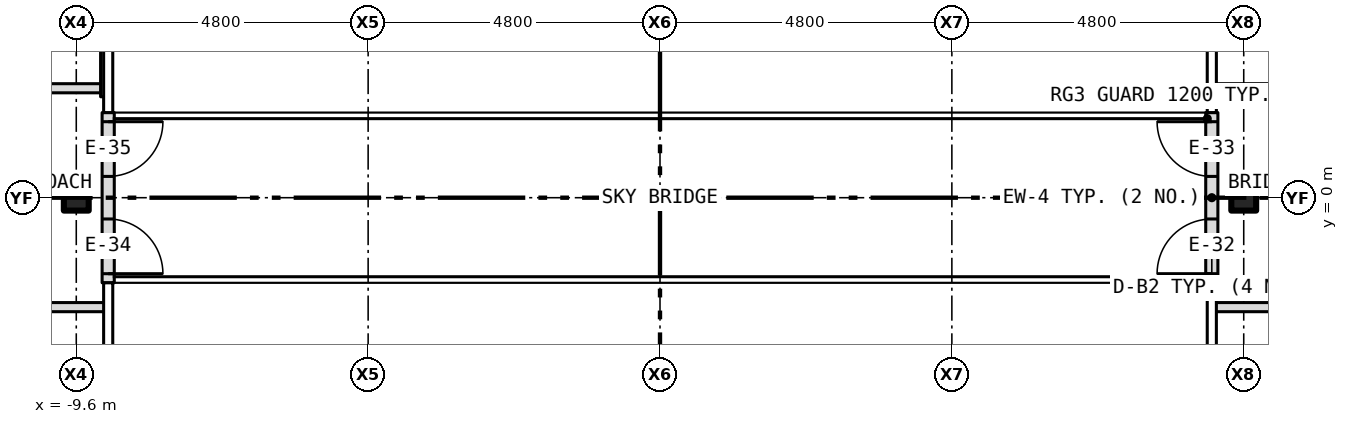
"""IFC4 building model, lengths in metres.
Left out: names, types, materials, properties, quantities, classifications, styles, units other than length and angle.
Written with IfcOpenShell. Run it as: python <this file> out.ifc"""

import sys

from ifc_helpers import new_model, si_unit, direction, frame, frame_2d, origin, origin_2d, place, context, subcontext, project, spatial, rectangle, i_section, extrude, element, fill, save


model = new_model("IFC4")
c1 = context("Model", 3, precision=1e-05, world=origin(), true_north=direction((0.0, 1.0)))
c2 = subcontext(c1, "Body", "Model", "MODEL_VIEW")
j1 = project(units=[si_unit("LENGTHUNIT", "METRE"), si_unit("PLANEANGLEUNIT", "RADIAN")], contexts=[c1])
p1 = place(None, origin())
s1 = spatial("IfcSite", under=j1, at=p1, CompositionType="ELEMENT")
p2 = place(p1, origin())
s2 = spatial("IfcBuilding", under=s1, at=p2, CompositionType="ELEMENT")
p3 = place(p2, frame((0.0, 0.0, 74.0)))
s3 = spatial("IfcBuildingStorey", under=s2, at=p3, CompositionType="ELEMENT", Elevation=74.0)
for number, where, z_axis, x_axis in (
    (1, (-9.6, 0.0, -0.15), (0.0, 0.0, 1.0), (1.0, 0.0, 0.0)),
    (2, (9.6, 0.0, -0.15), (0.0, 0.0, 1.0), (1.0, 0.0, 0.0)),
):
    element("IfcColumn", number, at=place(p3, frame(where, z_axis=z_axis, x_axis=x_axis)), inside=s3, PredefinedType="COLUMN", context=c2, shape_type="SweptSolid", body=[
        extrude(i_section(OverallWidth=0.409, OverallDepth=0.424, WebThickness=0.033, FlangeThickness=0.052, at=origin_2d()), origin(), (0.0, 0.0, 1.0), 3.5),
    ])
p4 = place(p3, frame((9.075, -1.4, 0.0), z_axis=(0.0, 0.0, 1.0), x_axis=(0.0, 1.0, 0.0)))
e3 = element("IfcWall", 3, at=p4, inside=s3, PredefinedType="SOLIDWALL", context=c2, shape_type="SweptSolid", body=[
    extrude(rectangle(XDim=2.8, YDim=0.2, at=frame_2d((1.4, 0.0))), origin(), (0.0, 0.0, 1.0), 3.5),
])
p5 = place(p4, frame((0.15, 0.0, 0.0)))
e4 = element("IfcOpeningElement", 4, at=p5, cuts=e3, PredefinedType="OPENING", context=c2, shape_type="SweptSolid", body=[
    extrude(rectangle(XDim=0.9, YDim=2.1, at=frame_2d((0.45, 1.05))), frame((0.0, 0.112, 0.0), z_axis=(0.0, -1.0, 0.0), x_axis=(1.0, 0.0, 0.0)), (0.0, 0.0, 1.0), 0.224),
])
p6 = place(p4, frame((1.75, 0.0, 0.0)))
e5 = element("IfcOpeningElement", 5, at=p6, cuts=e3, PredefinedType="OPENING", context=c2, shape_type="SweptSolid", body=[
    extrude(rectangle(XDim=0.9, YDim=2.1, at=frame_2d((0.45, 1.05))), frame((0.0, 0.112, 0.0), z_axis=(0.0, -1.0, 0.0), x_axis=(1.0, 0.0, 0.0)), (0.0, 0.0, 1.0), 0.224),
])
p7 = place(p3, frame((-9.075, -1.4, 0.0), z_axis=(0.0, 0.0, 1.0), x_axis=(0.0, 1.0, 0.0)))
e6 = element("IfcWall", 6, at=p7, inside=s3, PredefinedType="SOLIDWALL", context=c2, shape_type="SweptSolid", body=[
    extrude(rectangle(XDim=2.8, YDim=0.2, at=frame_2d((1.4, 0.0))), origin(), (0.0, 0.0, 1.0), 3.5),
])
p8 = place(p7, frame((0.15, 0.0, 0.0)))
e7 = element("IfcOpeningElement", 7, at=p8, cuts=e6, PredefinedType="OPENING", context=c2, shape_type="SweptSolid", body=[
    extrude(rectangle(XDim=0.9, YDim=2.1, at=frame_2d((0.45, 1.05))), frame((0.0, 0.112, 0.0), z_axis=(0.0, -1.0, 0.0), x_axis=(1.0, 0.0, 0.0)), (0.0, 0.0, 1.0), 0.224),
])
p9 = place(p7, frame((1.75, 0.0, 0.0)))
e8 = element("IfcOpeningElement", 8, at=p9, cuts=e6, PredefinedType="OPENING", context=c2, shape_type="SweptSolid", body=[
    extrude(rectangle(XDim=0.9, YDim=2.1, at=frame_2d((0.45, 1.05))), frame((0.0, 0.112, 0.0), z_axis=(0.0, -1.0, 0.0), x_axis=(1.0, 0.0, 0.0)), (0.0, 0.0, 1.0), 0.224),
])
for number, where, z_axis, x_axis in (
    (9, (-12.4, -1.8, 0.0), (0.0, 0.0, 1.0), (1.0, 0.0, 0.0)),
    (10, (9.12, -1.8, 0.0), (0.0, 0.0, 1.0), (1.0, 0.0, 0.0)),
):
    element("IfcWall", number, at=place(p3, frame(where, z_axis=z_axis, x_axis=x_axis)), inside=s3, PredefinedType="PARTITIONING", context=c2, shape_type="SweptSolid", body=[
        extrude(rectangle(XDim=3.28, YDim=0.15, at=frame_2d((1.64, 0.0))), origin(), (0.0, 0.0, 1.0), 3.35),
    ])
p10 = place(p3, frame((-12.4, 1.8, 0.0), z_axis=(0.0, 0.0, 1.0), x_axis=(1.0, 0.0, 0.0)))
e11 = element("IfcWall", 11, at=p10, inside=s3, PredefinedType="PARTITIONING", context=c2, shape_type="SweptSolid", body=[
    extrude(rectangle(XDim=3.25, YDim=0.15, at=frame_2d((1.625, 0.0))), origin(), (0.0, 0.0, 1.0), 3.35),
])
p11 = place(p3, frame((9.12, 1.8, 0.0), z_axis=(0.0, 0.0, 1.0), x_axis=(1.0, 0.0, 0.0)))
e12 = element("IfcWall", 12, at=p11, inside=s3, PredefinedType="PARTITIONING", context=c2, shape_type="SweptSolid", body=[
    extrude(rectangle(XDim=3.28, YDim=0.15, at=frame_2d((1.64, 0.0))), origin(), (0.0, 0.0, 1.0), 3.35),
])
p12 = place(p3, frame((-9.15, 1.66, 0.0), z_axis=(0.0, 0.0, 1.0), x_axis=(0.0, 1.0, 0.0)))
e13 = element("IfcWall", 13, at=p12, inside=s3, PredefinedType="PARTITIONING", context=c2, shape_type="SweptSolid", body=[
    extrude(rectangle(XDim=4.38, YDim=0.1, at=frame_2d((2.19, 0.0))), origin(), (0.0, 0.0, 1.0), 2.733),
])
p13 = place(p5, origin())
e14 = element("IfcDoor", 14, at=p13, inside=s3, OperationType="SINGLE_SWING_LEFT", PredefinedType="DOOR", context=c2, shape_type="SweptSolid", body=[
    extrude(rectangle(XDim=0.9, YDim=2.1, at=frame_2d((0.45, 1.05))), frame((0.0, 0.025, 0.0), z_axis=(0.0, -1.0, 0.0), x_axis=(1.0, 0.0, 0.0)), (0.0, 0.0, 1.0), 0.05),
])
fill(e4, e14)
p14 = place(p6, origin())
e15 = element("IfcDoor", 15, at=p14, inside=s3, OperationType="SINGLE_SWING_RIGHT", PredefinedType="DOOR", context=c2, shape_type="SweptSolid", body=[
    extrude(rectangle(XDim=0.9, YDim=2.1, at=frame_2d((0.45, 1.05))), frame((0.0, 0.025, 0.0), z_axis=(0.0, -1.0, 0.0), x_axis=(1.0, 0.0, 0.0)), (0.0, 0.0, 1.0), 0.05),
])
fill(e5, e15)
p15 = place(p8, origin())
e16 = element("IfcDoor", 16, at=p15, inside=s3, OperationType="SINGLE_SWING_LEFT", PredefinedType="DOOR", context=c2, shape_type="SweptSolid", body=[
    extrude(rectangle(XDim=0.9, YDim=2.1, at=frame_2d((0.45, 1.05))), frame((0.0, 0.025, 0.0), z_axis=(0.0, -1.0, 0.0), x_axis=(1.0, 0.0, 0.0)), (0.0, 0.0, 1.0), 0.05),
])
fill(e7, e16)
p16 = place(p9, origin())
e17 = element("IfcDoor", 17, at=p16, inside=s3, OperationType="SINGLE_SWING_RIGHT", PredefinedType="DOOR", context=c2, shape_type="SweptSolid", body=[
    extrude(rectangle(XDim=0.9, YDim=2.1, at=frame_2d((0.45, 1.05))), frame((0.0, 0.025, 0.0), z_axis=(0.0, -1.0, 0.0), x_axis=(1.0, 0.0, 0.0)), (0.0, 0.0, 1.0), 0.05),
])
fill(e8, e17)
save(model, sys.argv[1])
